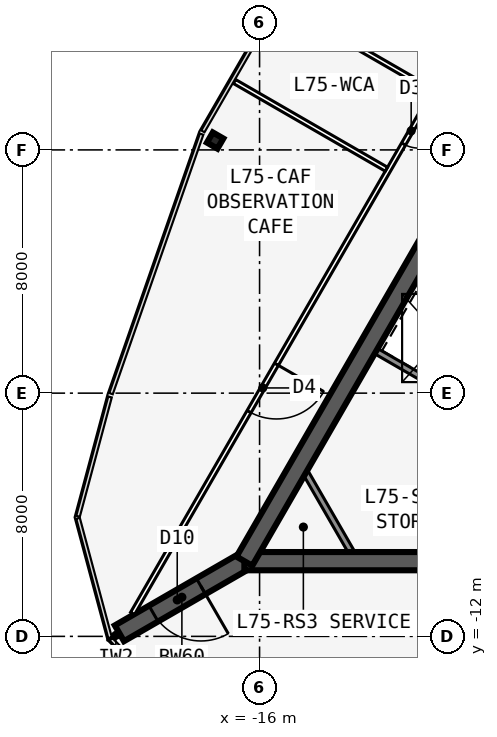
"""IFC4 building model, lengths in metres.
Left out: names, types, materials, properties, quantities, classifications, styles, units other than length and angle.
Written with IfcOpenShell. Run it as: python <this file> out.ifc"""

import sys

from ifc_helpers import new_model, si_unit, direction, frame, frame_2d, origin, origin_2d, place, context, subcontext, project, spatial, rectangle, i_section, extrude, element, fill, save


model = new_model("IFC4")
c1 = context("Model", 3, precision=1e-05, world=origin(), true_north=direction((0.0, 1.0)))
c2 = subcontext(c1, "Body", "Model", "MODEL_VIEW")
j1 = project(units=[si_unit("LENGTHUNIT", "METRE"), si_unit("PLANEANGLEUNIT", "RADIAN")], contexts=[c1])
p1 = place(None, origin())
s1 = spatial("IfcSite", under=j1, at=p1, CompositionType="ELEMENT")
p2 = place(p1, origin())
s2 = spatial("IfcBuilding", under=s1, at=p2, CompositionType="ELEMENT")
p3 = place(p2, frame((0.0, 0.0, 286.8)))
s3 = spatial("IfcBuildingStorey", under=s2, at=p3, CompositionType="ELEMENT", Elevation=286.8)
p4 = place(p3, frame((-16.5, -9.526, 0.0), z_axis=(0.0, 0.0, 1.0), x_axis=(1.0, 0.0, 0.0)))
e1 = element("IfcWall", 1, at=p4, inside=s3, PredefinedType="SHEAR", context=c2, shape_type="SweptSolid", body=[
    extrude(rectangle(XDim=33.0, YDim=0.6, at=frame_2d((16.5, 0.0))), origin(), (0.0, 0.0, 1.0), 6.0),
])
p5 = place(p4, frame((14.05, 0.0, 0.0)))
e2 = element("IfcOpeningElement", 2, at=p5, cuts=e1, PredefinedType="OPENING", context=c2, shape_type="SweptSolid", body=[
    extrude(rectangle(XDim=1.8, YDim=2.13, at=frame_2d((0.9, 1.065))), frame((0.0, 0.31, 0.0), z_axis=(0.0, -1.0, 0.0), x_axis=(1.0, 0.0, 0.0)), (0.0, 0.0, 1.0), 0.62),
])
p6 = place(p3, frame((0.0, 19.052, 0.0), z_axis=(0.0, 0.0, 1.0), x_axis=(-0.499999749417, -0.866025548458, 0.0)))
e3 = element("IfcWall", 3, at=p6, inside=s3, PredefinedType="SHEAR", context=c2, shape_type="SweptSolid", body=[
    extrude(rectangle(XDim=33.0, YDim=0.6, at=frame_2d((16.5, 0.0))), origin(), (0.0, 0.0, 1.0), 6.0),
])
p7 = place(p6, frame((14.15, 0.0, 0.0)))
e4 = element("IfcOpeningElement", 4, at=p7, cuts=e3, PredefinedType="OPENING", context=c2, shape_type="SweptSolid", body=[
    extrude(rectangle(XDim=1.8, YDim=2.13, at=frame_2d((0.9, 1.065))), frame((0.0, 0.31, 0.0), z_axis=(0.0, -1.0, 0.0), x_axis=(1.0, 0.0, 0.0)), (0.0, 0.0, 1.0), 0.62),
])
p8 = place(p6, frame((12.6, 0.0, 0.0)))
e5 = element("IfcOpeningElement", 5, at=p8, cuts=e3, PredefinedType="OPENING", context=c2, shape_type="SweptSolid", body=[
    extrude(rectangle(XDim=1.0, YDim=2.13, at=frame_2d((0.5, 1.065))), frame((0.0, 0.31, 0.0), z_axis=(0.0, -1.0, 0.0), x_axis=(1.0, 0.0, 0.0)), (0.0, 0.0, 1.0), 0.62),
])
p9 = place(p3, frame((-9.329, -4.256, 0.0), z_axis=(0.0, 0.0, 1.0), x_axis=(-0.866027924134, 0.499995634601, 0.0)))
e6 = element("IfcWall", 6, at=p9, inside=s3, PredefinedType="SOLIDWALL", context=c2, shape_type="SweptSolid", body=[
    extrude(rectangle(XDim=3.275, YDim=0.2, at=frame_2d((1.637, 0.0))), origin(), (0.0, 0.0, 1.0), 5.75),
])
p10 = place(p3, frame((-16.5, -9.526, 0.0), z_axis=(0.0, 0.0, 1.0), x_axis=(-0.866031398331, -0.499989616998, 0.0)))
e7 = element("IfcWall", 7, at=p10, inside=s3, PredefinedType="SHEAR", context=c2, shape_type="SweptSolid", body=[
    extrude(rectangle(XDim=4.746, YDim=0.6, at=frame_2d((2.373, 0.0))), origin(), (0.0, 0.0, 1.0), 6.0),
])
p11 = place(p10, frame((1.65, 0.0, 0.0)))
e8 = element("IfcOpeningElement", 8, at=p11, cuts=e7, PredefinedType="OPENING", context=c2, shape_type="SweptSolid", body=[
    extrude(rectangle(XDim=1.8, YDim=2.13, at=frame_2d((0.9, 1.065))), frame((0.0, 0.31, 0.0), z_axis=(0.0, -1.0, 0.0), x_axis=(1.0, 0.0, 0.0)), (0.0, 0.0, 1.0), 0.62),
])
p12 = place(p3, frame((-17.461, 4.308, 0.0), z_axis=(0.0, 0.0, 1.0), x_axis=(-0.866025403784, 0.5, 0.0)))
e9 = element("IfcColumn", 9, at=p12, inside=s3, PredefinedType="COLUMN", context=c2, shape_type="SweptSolid", body=[
    extrude(i_section(OverallWidth=0.399, OverallDepth=0.386, WebThickness=0.021, FlangeThickness=0.033, at=origin_2d()), origin(), (0.0, 0.0, 1.0), 6.0),
])
p13 = place(p3, frame((-0.35, 23.096, 0.0), z_axis=(0.0, 0.0, 1.0), x_axis=(-0.499998875317, -0.866026053119, 0.0)))
e10 = element("IfcWall", 10, at=p13, inside=s3, PredefinedType="PARTITIONING", context=c2, shape_type="SweptSolid", body=[
    extrude(rectangle(XDim=39.654, YDim=0.15, at=frame_2d((19.827, 0.0))), origin(), (0.0, 0.0, 1.0), 5.75),
])
p14 = place(p13, frame((8.063, 0.0, 0.0)))
e11 = element("IfcOpeningElement", 11, at=p14, cuts=e10, PredefinedType="OPENING", context=c2, shape_type="SweptSolid", body=[
    extrude(rectangle(XDim=1.0, YDim=2.13, at=frame_2d((0.5, 1.065))), frame((0.0, 0.085, 0.0), z_axis=(0.0, -1.0, 0.0), x_axis=(1.0, 0.0, 0.0)), (0.0, 0.0, 1.0), 0.17),
])
p15 = place(p13, frame((17.827, 0.0, 0.0)))
e12 = element("IfcOpeningElement", 12, at=p15, cuts=e10, PredefinedType="OPENING", context=c2, shape_type="SweptSolid", body=[
    extrude(rectangle(XDim=1.0, YDim=2.13, at=frame_2d((0.5, 1.065))), frame((0.0, 0.085, 0.0), z_axis=(0.0, -1.0, 0.0), x_axis=(1.0, 0.0, 0.0)), (0.0, 0.0, 1.0), 0.17),
])
p16 = place(p13, frame((20.827, 0.0, 0.0)))
e13 = element("IfcOpeningElement", 13, at=p16, cuts=e10, PredefinedType="OPENING", context=c2, shape_type="SweptSolid", body=[
    extrude(rectangle(XDim=1.0, YDim=2.13, at=frame_2d((0.5, 1.065))), frame((0.0, 0.085, 0.0), z_axis=(0.0, -1.0, 0.0), x_axis=(1.0, 0.0, 0.0)), (0.0, 0.0, 1.0), 0.17),
])
p17 = place(p13, frame((30.19, 0.0, 0.0)))
e14 = element("IfcOpeningElement", 14, at=p17, cuts=e10, PredefinedType="OPENING", context=c2, shape_type="SweptSolid", body=[
    extrude(rectangle(XDim=1.8, YDim=2.13, at=frame_2d((0.9, 1.065))), frame((0.0, 0.085, 0.0), z_axis=(0.0, -1.0, 0.0), x_axis=(1.0, 0.0, 0.0)), (0.0, 0.0, 1.0), 0.17),
])
p18 = place(p3, frame((-10.329, 5.963, 0.0), z_axis=(0.0, 0.0, 1.0), x_axis=(-0.866015751745, 0.50001671745, 0.0)))
e15 = element("IfcWall", 15, at=p18, inside=s3, PredefinedType="PARTITIONING", context=c2, shape_type="SweptSolid", body=[
    extrude(rectangle(XDim=5.769, YDim=0.15, at=frame_2d((2.885, 0.0))), origin(), (0.0, 0.0, 1.0), 4.894),
])
p19 = place(p3, frame((-11.829, 3.365, 0.0), z_axis=(0.0, 0.0, 1.0), x_axis=(-0.866015751745, 0.50001671745, 0.0)))
e16 = element("IfcWall", 16, at=p19, inside=s3, PredefinedType="PARTITIONING", context=c2, shape_type="SweptSolid", body=[
    extrude(rectangle(XDim=5.769, YDim=0.15, at=frame_2d((2.885, 0.0))), origin(), (0.0, 0.0, 1.0), 5.75),
])
p20 = place(p3, frame((-20.61, -11.899, 0.0), z_axis=(0.0, 0.0, 1.0), x_axis=(-0.866065156741, -0.499931139538, 0.0)))
e17 = element("IfcWall", 17, at=p20, inside=s3, PredefinedType="PARTITIONING", context=c2, shape_type="SweptSolid", body=[
    extrude(rectangle(XDim=0.27, YDim=0.15, at=frame_2d((0.135, 0.0))), origin(), (0.0, 0.0, 1.0), 5.75),
])
p21 = place(p3, frame((-12.978, -9.226, 0.0), z_axis=(0.0, 0.0, 1.0), x_axis=(-0.499952404951, 0.866052881055, 0.0)))
e18 = element("IfcWall", 18, at=p21, inside=s3, PredefinedType="SOLIDWALL", context=c2, shape_type="SweptSolid", body=[
    extrude(rectangle(XDim=3.002, YDim=0.2, at=frame_2d((1.501, 0.0))), origin(), (0.0, 0.0, 1.0), 5.75),
])
p22 = place(p16, origin())
e19 = element("IfcDoor", 19, at=p22, inside=s3, OperationType="SINGLE_SWING_LEFT", PredefinedType="DOOR", context=c2, shape_type="SweptSolid", body=[
    extrude(rectangle(XDim=1.0, YDim=2.13, at=frame_2d((0.5, 1.065))), frame((0.0, 0.025, 0.0), z_axis=(0.0, -1.0, 0.0), x_axis=(1.0, 0.0, 0.0)), (0.0, 0.0, 1.0), 0.05),
])
fill(e13, e19)
p23 = place(p17, origin())
e20 = element("IfcDoor", 20, at=p23, inside=s3, OperationType="DOUBLE_DOOR_SINGLE_SWING", PredefinedType="DOOR", context=c2, shape_type="SweptSolid", body=[
    extrude(rectangle(XDim=1.8, YDim=2.13, at=frame_2d((0.9, 1.065))), frame((0.0, 0.025, 0.0), z_axis=(0.0, -1.0, 0.0), x_axis=(1.0, 0.0, 0.0)), (0.0, 0.0, 1.0), 0.05),
])
fill(e14, e20)
p24 = place(p11, origin())
e21 = element("IfcDoor", 21, at=p24, inside=s3, OperationType="DOUBLE_DOOR_DOUBLE_SWING", PredefinedType="DOOR", context=c2, shape_type="SweptSolid", body=[
    extrude(rectangle(XDim=1.8, YDim=2.13, at=frame_2d((0.9, 1.065))), frame((0.0, 0.025, 0.0), z_axis=(0.0, -1.0, 0.0), x_axis=(1.0, 0.0, 0.0)), (0.0, 0.0, 1.0), 0.05),
])
fill(e8, e21)
save(model, sys.argv[1])
